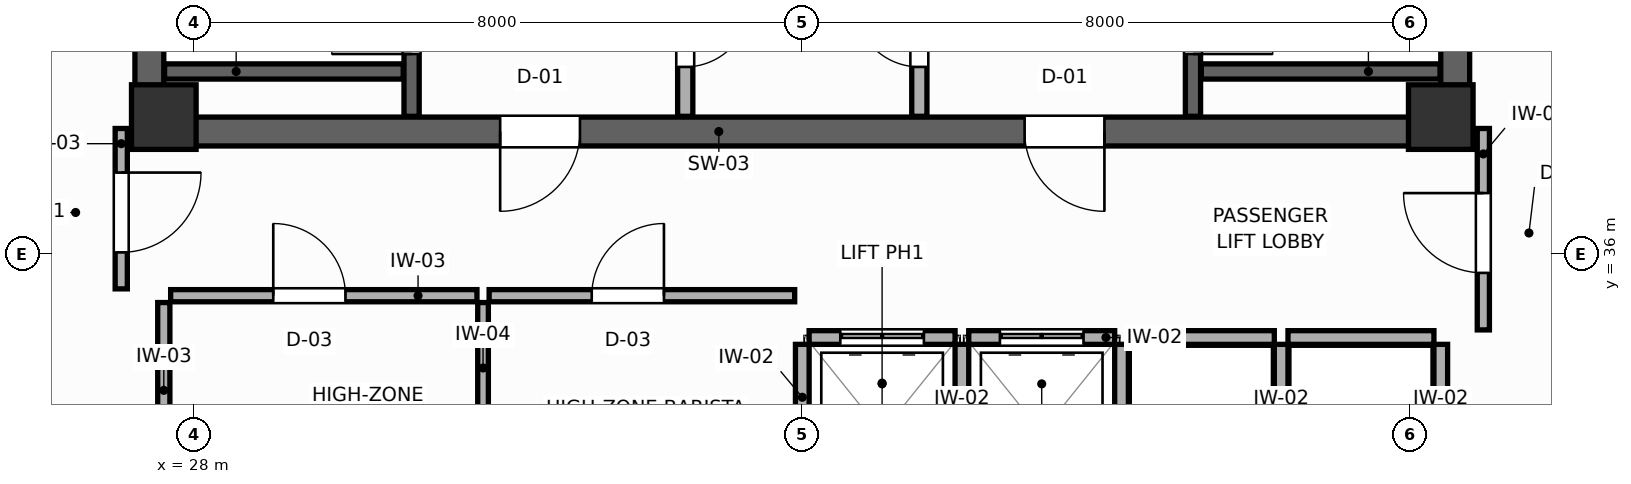
"""IFC4 building model, lengths in metres.
Left out: names, types, materials, properties, quantities, classifications, styles, units other than length and angle.
Written with IfcOpenShell. Run it as: python <this file> out.ifc"""

import sys

from ifc_helpers import new_model, si_unit, direction, frame, frame_2d, origin, origin_2d, place, context, subcontext, project, spatial, rectangle, extrude, source, transform, mapped, element, fill, save


model = new_model("IFC4")
c1 = context("Model", 3, precision=1e-05, world=origin(), true_north=direction((0.0, 1.0)))
c2 = subcontext(c1, "Body", "Model", "MODEL_VIEW")
j1 = project(units=[si_unit("LENGTHUNIT", "METRE"), si_unit("PLANEANGLEUNIT", "RADIAN")], contexts=[c1])
p1 = place(None, origin())
s1 = spatial("IfcSite", under=j1, at=p1, CompositionType="ELEMENT")
p2 = place(p1, origin())
s2 = spatial("IfcBuilding", under=s1, at=p2, CompositionType="ELEMENT")
p3 = place(p2, frame((0.0, 0.0, 268.2)))
s3 = spatial("IfcBuildingStorey", under=s2, at=p3, CompositionType="ELEMENT", Elevation=268.2)
p4 = place(p3, frame((27.22, 37.61, 0.0), z_axis=(0.0, 0.0, 1.0), x_axis=(1.0, 0.0, 0.0)))
e1 = element("IfcWall", 1, at=p4, inside=s3, PredefinedType="SHEAR", context=c2, shape_type="SweptSolid", body=[
    extrude(rectangle(XDim=17.56, YDim=0.38, at=frame_2d((8.78, 0.0))), origin(), (0.0, 0.0, 1.0), 3.6),
])
p5 = place(p4, frame((4.805, 0.0, 0.0)))
e2 = element("IfcOpeningElement", 2, at=p5, cuts=e1, PredefinedType="OPENING", context=c2, shape_type="SweptSolid", body=[
    extrude(rectangle(XDim=1.05, YDim=2.1, at=frame_2d((0.525, 1.05))), frame((0.0, 0.2, 0.0), z_axis=(0.0, -1.0, 0.0), x_axis=(1.0, 0.0, 0.0)), (0.0, 0.0, 1.0), 0.4),
])
p6 = place(p4, frame((11.705, 0.0, 0.0)))
e3 = element("IfcOpeningElement", 3, at=p6, cuts=e1, PredefinedType="OPENING", context=c2, shape_type="SweptSolid", body=[
    extrude(rectangle(XDim=1.05, YDim=2.1, at=frame_2d((0.525, 1.05))), frame((0.0, 0.2, 0.0), z_axis=(0.0, -1.0, 0.0), x_axis=(1.0, 0.0, 0.0)), (0.0, 0.0, 1.0), 0.4),
])
for number, where, z_axis, x_axis in (
    (4, (27.41, 37.8, 0.0), (0.0, 0.0, 1.0), (0.0, 1.0, 0.0)),
    (5, (44.59, 37.8, 0.0), (0.0, 0.0, 1.0), (0.0, 1.0, 0.0)),
):
    element("IfcWall", number, at=place(p3, frame(where, z_axis=z_axis, x_axis=x_axis)), inside=s3, PredefinedType="SHEAR", context=c2, shape_type="SweptSolid", body=[
        extrude(rectangle(XDim=9.0, YDim=0.38, at=frame_2d((4.5, 0.0))), origin(), (0.0, 0.0, 1.0), 3.6),
    ])
m1 = source(origin(), c2, "Body", "SweptSolid", [
    extrude(rectangle(XDim=0.85, YDim=0.85, at=origin_2d()), origin(), (0.0, 0.0, 1.0), 3.6),
])
for number, where, z_axis, x_axis in (
    (6, (27.6, 37.8, 0.0), (0.0, 0.0, 1.0), (1.0, 0.0, 0.0)),
    (7, (44.4, 37.8, 0.0), (0.0, 0.0, 1.0), (1.0, 0.0, 0.0)),
):
    element("IfcColumn", number, at=place(p3, frame(where, z_axis=z_axis, x_axis=x_axis)), inside=s3, PredefinedType="COLUMN", context=c2, shape_type="MappedRepresentation", body=[
        mapped(m1, transform((0.0, 0.0, 0.0), scale=1.0)),
    ])
p7 = place(p3, frame((30.86, 37.81, 0.0), z_axis=(0.0, 0.0, 1.0), x_axis=(0.0, 1.0, 0.0)))
e8 = element("IfcWall", 8, at=p7, inside=s3, PredefinedType="SHEAR", context=c2, shape_type="SweptSolid", body=[
    extrude(rectangle(XDim=8.98, YDim=0.2, at=frame_2d((4.49, 0.0))), origin(), (0.0, 0.0, 1.0), 3.6),
])
p8 = place(p7, frame((0.82, 0.0, 0.0)))
e9 = element("IfcOpeningElement", 9, at=p8, cuts=e8, PredefinedType="OPENING", context=c2, shape_type="SweptSolid", body=[
    extrude(rectangle(XDim=1.05, YDim=2.1, at=frame_2d((0.525, 1.05))), frame((0.0, 0.11, 0.0), z_axis=(0.0, -1.0, 0.0), x_axis=(1.0, 0.0, 0.0)), (0.0, 0.0, 1.0), 0.22),
])
p9 = place(p3, frame((27.61, 38.4, 0.0), z_axis=(0.0, 0.0, 1.0), x_axis=(1.0, 0.0, 0.0)))
e10 = element("IfcWall", 10, at=p9, inside=s3, PredefinedType="SHEAR", context=c2, shape_type="SweptSolid", body=[
    extrude(rectangle(XDim=3.14, YDim=0.2, at=frame_2d((1.57, 0.0))), origin(), (0.0, 0.0, 1.0), 3.6),
])
p10 = place(p3, frame((41.14, 37.81, 0.0), z_axis=(0.0, 0.0, 1.0), x_axis=(0.0, 1.0, 0.0)))
e11 = element("IfcWall", 11, at=p10, inside=s3, PredefinedType="SHEAR", context=c2, shape_type="SweptSolid", body=[
    extrude(rectangle(XDim=8.98, YDim=0.2, at=frame_2d((4.49, 0.0))), origin(), (0.0, 0.0, 1.0), 3.6),
])
p11 = place(p10, frame((0.82, 0.0, 0.0)))
e12 = element("IfcOpeningElement", 12, at=p11, cuts=e11, PredefinedType="OPENING", context=c2, shape_type="SweptSolid", body=[
    extrude(rectangle(XDim=1.05, YDim=2.1, at=frame_2d((0.525, 1.05))), frame((0.0, 0.11, 0.0), z_axis=(0.0, -1.0, 0.0), x_axis=(1.0, 0.0, 0.0)), (0.0, 0.0, 1.0), 0.22),
])
p12 = place(p3, frame((41.25, 38.4, 0.0), z_axis=(0.0, 0.0, 1.0), x_axis=(1.0, 0.0, 0.0)))
e13 = element("IfcWall", 13, at=p12, inside=s3, PredefinedType="SHEAR", context=c2, shape_type="SweptSolid", body=[
    extrude(rectangle(XDim=3.14, YDim=0.2, at=frame_2d((1.57, 0.0))), origin(), (0.0, 0.0, 1.0), 3.6),
])
p13 = place(p3, frame((34.46, 37.81, 0.0), z_axis=(0.0, 0.0, 1.0), x_axis=(0.0, 1.0, 0.0)))
e14 = element("IfcWall", 14, at=p13, inside=s3, PredefinedType="PARTITIONING", context=c2, shape_type="SweptSolid", body=[
    extrude(rectangle(XDim=8.98, YDim=0.2, at=frame_2d((4.49, 0.0))), origin(), (0.0, 0.0, 1.0), 3.41),
])
p14 = place(p13, frame((0.65, 0.0, 0.0)))
e15 = element("IfcOpeningElement", 15, at=p14, cuts=e14, PredefinedType="OPENING", context=c2, shape_type="SweptSolid", body=[
    extrude(rectangle(XDim=0.85, YDim=2.05, at=frame_2d((0.425, 1.025))), frame((0.0, 0.11, 0.0), z_axis=(0.0, -1.0, 0.0), x_axis=(1.0, 0.0, 0.0)), (0.0, 0.0, 1.0), 0.22),
])
p15 = place(p3, frame((37.54, 37.81, 0.0), z_axis=(0.0, 0.0, 1.0), x_axis=(0.0, 1.0, 0.0)))
e16 = element("IfcWall", 16, at=p15, inside=s3, PredefinedType="PARTITIONING", context=c2, shape_type="SweptSolid", body=[
    extrude(rectangle(XDim=8.98, YDim=0.2, at=frame_2d((4.49, 0.0))), origin(), (0.0, 0.0, 1.0), 3.41),
])
p16 = place(p15, frame((0.65, 0.0, 0.0)))
e17 = element("IfcOpeningElement", 17, at=p16, cuts=e16, PredefinedType="OPENING", context=c2, shape_type="SweptSolid", body=[
    extrude(rectangle(XDim=0.85, YDim=2.05, at=frame_2d((0.425, 1.025))), frame((0.0, 0.11, 0.0), z_axis=(0.0, -1.0, 0.0), x_axis=(1.0, 0.0, 0.0)), (0.0, 0.0, 1.0), 0.22),
])
p17 = place(p3, frame((36.09, 34.9, 0.0), z_axis=(0.0, 0.0, 1.0), x_axis=(1.0, 0.0, 0.0)))
e18 = element("IfcWall", 18, at=p17, inside=s3, PredefinedType="PARTITIONING", context=c2, shape_type="SweptSolid", body=[
    extrude(rectangle(XDim=1.92, YDim=0.18, at=frame_2d((0.96, 0.0))), origin(), (0.0, 0.0, 1.0), 3.41),
])
p18 = place(p17, frame((0.41, 0.0, 0.0)))
e19 = element("IfcOpeningElement", 19, at=p18, cuts=e18, PredefinedType="OPENING", context=c2, shape_type="SweptSolid", body=[
    extrude(rectangle(XDim=1.1, YDim=2.1, at=frame_2d((0.55, 1.05))), frame((0.0, 0.1, 0.0), z_axis=(0.0, -1.0, 0.0), x_axis=(1.0, 0.0, 0.0)), (0.0, 0.0, 1.0), 0.2),
])
p19 = place(p3, frame((36.0, 32.49, 0.0), z_axis=(0.0, 0.0, 1.0), x_axis=(0.0, 1.0, 0.0)))
e20 = element("IfcWall", 20, at=p19, inside=s3, PredefinedType="PARTITIONING", context=c2, shape_type="SweptSolid", body=[
    extrude(rectangle(XDim=2.32, YDim=0.18, at=frame_2d((1.16, 0.0))), origin(), (0.0, 0.0, 1.0), 3.41),
])
p20 = place(p3, frame((38.19, 34.9, 0.0), z_axis=(0.0, 0.0, 1.0), x_axis=(1.0, 0.0, 0.0)))
e21 = element("IfcWall", 21, at=p20, inside=s3, PredefinedType="PARTITIONING", context=c2, shape_type="SweptSolid", body=[
    extrude(rectangle(XDim=1.92, YDim=0.18, at=frame_2d((0.96, 0.0))), origin(), (0.0, 0.0, 1.0), 3.41),
])
p21 = place(p20, frame((0.41, 0.0, 0.0)))
e22 = element("IfcOpeningElement", 22, at=p21, cuts=e21, PredefinedType="OPENING", context=c2, shape_type="SweptSolid", body=[
    extrude(rectangle(XDim=1.1, YDim=2.1, at=frame_2d((0.55, 1.05))), frame((0.0, 0.1, 0.0), z_axis=(0.0, -1.0, 0.0), x_axis=(1.0, 0.0, 0.0)), (0.0, 0.0, 1.0), 0.2),
])
p22 = place(p3, frame((38.1, 32.49, 0.0), z_axis=(0.0, 0.0, 1.0), x_axis=(0.0, 1.0, 0.0)))
e23 = element("IfcWall", 23, at=p22, inside=s3, PredefinedType="PARTITIONING", context=c2, shape_type="SweptSolid", body=[
    extrude(rectangle(XDim=2.32, YDim=0.18, at=frame_2d((1.16, 0.0))), origin(), (0.0, 0.0, 1.0), 3.41),
])
p23 = place(p3, frame((40.29, 34.9, 0.0), z_axis=(0.0, 0.0, 1.0), x_axis=(1.0, 0.0, 0.0)))
e24 = element("IfcWall", 24, at=p23, inside=s3, PredefinedType="PARTITIONING", context=c2, shape_type="SweptSolid", body=[
    extrude(rectangle(XDim=1.92, YDim=0.18, at=frame_2d((0.96, 0.0))), origin(), (0.0, 0.0, 1.0), 3.41),
])
p24 = place(p3, frame((40.2, 32.49, 0.0), z_axis=(0.0, 0.0, 1.0), x_axis=(0.0, 1.0, 0.0)))
e25 = element("IfcWall", 25, at=p24, inside=s3, PredefinedType="PARTITIONING", context=c2, shape_type="SweptSolid", body=[
    extrude(rectangle(XDim=2.32, YDim=0.18, at=frame_2d((1.16, 0.0))), origin(), (0.0, 0.0, 1.0), 3.41),
])
p25 = place(p3, frame((42.39, 34.9, 0.0), z_axis=(0.0, 0.0, 1.0), x_axis=(1.0, 0.0, 0.0)))
e26 = element("IfcWall", 26, at=p25, inside=s3, PredefinedType="PARTITIONING", context=c2, shape_type="SweptSolid", body=[
    extrude(rectangle(XDim=1.92, YDim=0.18, at=frame_2d((0.96, 0.0))), origin(), (0.0, 0.0, 1.0), 3.41),
])
for number, where, z_axis, x_axis in (
    (27, (42.3, 32.49, 0.0), (0.0, 0.0, 1.0), (0.0, 1.0, 0.0)),
    (28, (44.4, 32.49, 0.0), (0.0, 0.0, 1.0), (0.0, 1.0, 0.0)),
):
    element("IfcWall", number, at=place(p3, frame(where, z_axis=z_axis, x_axis=x_axis)), inside=s3, PredefinedType="PARTITIONING", context=c2, shape_type="SweptSolid", body=[
        extrude(rectangle(XDim=2.32, YDim=0.18, at=frame_2d((1.16, 0.0))), origin(), (0.0, 0.0, 1.0), 3.41),
    ])
p26 = place(p3, frame((27.6, 33.05, 0.0), z_axis=(0.0, 0.0, 1.0), x_axis=(0.0, 1.0, 0.0)))
e29 = element("IfcWall", 29, at=p26, inside=s3, PredefinedType="PARTITIONING", context=c2, shape_type="SweptSolid", body=[
    extrude(rectangle(XDim=2.31, YDim=0.16, at=frame_2d((1.155, 0.0))), origin(), (0.0, 0.0, 1.0), 3.41),
])
p27 = place(p3, frame((31.8, 32.49, 0.0), z_axis=(0.0, 0.0, 1.0), x_axis=(0.0, 1.0, 0.0)))
e30 = element("IfcWall", 30, at=p27, inside=s3, PredefinedType="PARTITIONING", context=c2, shape_type="SweptSolid", body=[
    extrude(rectangle(XDim=2.87, YDim=0.14, at=frame_2d((1.435, 0.0))), origin(), (0.0, 0.0, 1.0), 3.41),
])
p28 = place(p3, frame((27.69, 35.45, 0.0), z_axis=(0.0, 0.0, 1.0), x_axis=(1.0, 0.0, 0.0)))
e31 = element("IfcWall", 31, at=p28, inside=s3, PredefinedType="PARTITIONING", context=c2, shape_type="SweptSolid", body=[
    extrude(rectangle(XDim=4.03, YDim=0.16, at=frame_2d((2.015, 0.0))), origin(), (0.0, 0.0, 1.0), 3.41),
])
p29 = place(p28, frame((1.35, 0.0, 0.0)))
e32 = element("IfcOpeningElement", 32, at=p29, cuts=e31, PredefinedType="OPENING", context=c2, shape_type="SweptSolid", body=[
    extrude(rectangle(XDim=0.95, YDim=2.05, at=frame_2d((0.475, 1.025))), frame((0.0, 0.09, 0.0), z_axis=(0.0, -1.0, 0.0), x_axis=(1.0, 0.0, 0.0)), (0.0, 0.0, 1.0), 0.18),
])
p30 = place(p3, frame((31.88, 35.45, 0.0), z_axis=(0.0, 0.0, 1.0), x_axis=(1.0, 0.0, 0.0)))
e33 = element("IfcWall", 33, at=p30, inside=s3, PredefinedType="PARTITIONING", context=c2, shape_type="SweptSolid", body=[
    extrude(rectangle(XDim=4.02, YDim=0.16, at=frame_2d((2.01, 0.0))), origin(), (0.0, 0.0, 1.0), 3.41),
])
p31 = place(p30, frame((1.35, 0.0, 0.0)))
e34 = element("IfcOpeningElement", 34, at=p31, cuts=e33, PredefinedType="OPENING", context=c2, shape_type="SweptSolid", body=[
    extrude(rectangle(XDim=0.95, YDim=2.05, at=frame_2d((0.475, 1.025))), frame((0.0, 0.09, 0.0), z_axis=(0.0, -1.0, 0.0), x_axis=(1.0, 0.0, 0.0)), (0.0, 0.0, 1.0), 0.18),
])
p32 = place(p3, frame((27.04, 35.54, 0.0), z_axis=(0.0, 0.0, 1.0), x_axis=(0.0, 1.0, 0.0)))
e35 = element("IfcWall", 35, at=p32, inside=s3, PredefinedType="PARTITIONING", context=c2, shape_type="SweptSolid", body=[
    extrude(rectangle(XDim=2.11, YDim=0.16, at=frame_2d((1.055, 0.0))), origin(), (0.0, 0.0, 1.0), 3.41),
])
p33 = place(p32, frame((0.48, 0.0, 0.0)))
e36 = element("IfcOpeningElement", 36, at=p33, cuts=e35, PredefinedType="OPENING", context=c2, shape_type="SweptSolid", body=[
    extrude(rectangle(XDim=1.05, YDim=2.1, at=frame_2d((0.525, 1.05))), frame((0.0, 0.09, 0.0), z_axis=(0.0, -1.0, 0.0), x_axis=(1.0, 0.0, 0.0)), (0.0, 0.0, 1.0), 0.18),
])
p34 = place(p3, frame((44.96, 35.0, 0.0), z_axis=(0.0, 0.0, 1.0), x_axis=(0.0, 1.0, 0.0)))
e37 = element("IfcWall", 37, at=p34, inside=s3, PredefinedType="PARTITIONING", context=c2, shape_type="SweptSolid", body=[
    extrude(rectangle(XDim=2.65, YDim=0.16, at=frame_2d((1.325, 0.0))), origin(), (0.0, 0.0, 1.0), 3.41),
])
p35 = place(p34, frame((0.75, 0.0, 0.0)))
e38 = element("IfcOpeningElement", 38, at=p35, cuts=e37, PredefinedType="OPENING", context=c2, shape_type="SweptSolid", body=[
    extrude(rectangle(XDim=1.05, YDim=2.1, at=frame_2d((0.525, 1.05))), frame((0.0, 0.09, 0.0), z_axis=(0.0, -1.0, 0.0), x_axis=(1.0, 0.0, 0.0)), (0.0, 0.0, 1.0), 0.18),
])
p36 = place(p8, origin())
e39 = element("IfcDoor", 39, at=p36, inside=s3, OperationType="SINGLE_SWING_LEFT", PredefinedType="DOOR", context=c2, shape_type="SweptSolid", body=[
    extrude(rectangle(XDim=1.05, YDim=2.1, at=frame_2d((0.525, 1.05))), frame((0.0, 0.025, 0.0), z_axis=(0.0, -1.0, 0.0), x_axis=(1.0, 0.0, 0.0)), (0.0, 0.0, 1.0), 0.05),
])
fill(e9, e39)
p37 = place(p11, frame((1.05, 0.0, 0.0), z_axis=(0.0, 0.0, 1.0), x_axis=(-1.0, 0.0, 0.0)))
e40 = element("IfcDoor", 40, at=p37, inside=s3, OperationType="SINGLE_SWING_RIGHT", PredefinedType="DOOR", context=c2, shape_type="SweptSolid", body=[
    extrude(rectangle(XDim=1.05, YDim=2.1, at=frame_2d((0.525, 1.05))), frame((0.0, 0.025, 0.0), z_axis=(0.0, -1.0, 0.0), x_axis=(1.0, 0.0, 0.0)), (0.0, 0.0, 1.0), 0.05),
])
fill(e12, e40)
p38 = place(p14, frame((0.85, 0.0, 0.0), z_axis=(0.0, 0.0, 1.0), x_axis=(-1.0, 0.0, 0.0)))
e41 = element("IfcDoor", 41, at=p38, inside=s3, OperationType="SINGLE_SWING_LEFT", PredefinedType="DOOR", context=c2, shape_type="SweptSolid", body=[
    extrude(rectangle(XDim=0.85, YDim=2.05, at=frame_2d((0.425, 1.025))), frame((0.0, 0.025, 0.0), z_axis=(0.0, -1.0, 0.0), x_axis=(1.0, 0.0, 0.0)), (0.0, 0.0, 1.0), 0.05),
])
fill(e15, e41)
p39 = place(p16, origin())
e42 = element("IfcDoor", 42, at=p39, inside=s3, OperationType="SINGLE_SWING_RIGHT", PredefinedType="DOOR", context=c2, shape_type="SweptSolid", body=[
    extrude(rectangle(XDim=0.85, YDim=2.05, at=frame_2d((0.425, 1.025))), frame((0.0, 0.025, 0.0), z_axis=(0.0, -1.0, 0.0), x_axis=(1.0, 0.0, 0.0)), (0.0, 0.0, 1.0), 0.05),
])
fill(e17, e42)
p40 = place(p18, origin())
e43 = element("IfcDoor", 43, at=p40, inside=s3, OperationType="DOUBLE_DOOR_SLIDING", PredefinedType="DOOR", context=c2, shape_type="SweptSolid", body=[
    extrude(rectangle(XDim=1.1, YDim=2.1, at=frame_2d((0.55, 1.05))), frame((0.0, 0.025, 0.0), z_axis=(0.0, -1.0, 0.0), x_axis=(1.0, 0.0, 0.0)), (0.0, 0.0, 1.0), 0.05),
])
fill(e19, e43)
p41 = place(p21, origin())
e44 = element("IfcDoor", 44, at=p41, inside=s3, OperationType="DOUBLE_DOOR_SLIDING", PredefinedType="DOOR", context=c2, shape_type="SweptSolid", body=[
    extrude(rectangle(XDim=1.1, YDim=2.1, at=frame_2d((0.55, 1.05))), frame((0.0, 0.025, 0.0), z_axis=(0.0, -1.0, 0.0), x_axis=(1.0, 0.0, 0.0)), (0.0, 0.0, 1.0), 0.05),
])
fill(e22, e44)
p42 = place(p29, origin())
e45 = element("IfcDoor", 45, at=p42, inside=s3, OperationType="SINGLE_SWING_LEFT", PredefinedType="DOOR", context=c2, shape_type="SweptSolid", body=[
    extrude(rectangle(XDim=0.95, YDim=2.05, at=frame_2d((0.475, 1.025))), frame((0.0, 0.025, 0.0), z_axis=(0.0, -1.0, 0.0), x_axis=(1.0, 0.0, 0.0)), (0.0, 0.0, 1.0), 0.05),
])
fill(e32, e45)
p43 = place(p31, origin())
e46 = element("IfcDoor", 46, at=p43, inside=s3, OperationType="SINGLE_SWING_RIGHT", PredefinedType="DOOR", context=c2, shape_type="SweptSolid", body=[
    extrude(rectangle(XDim=0.95, YDim=2.05, at=frame_2d((0.475, 1.025))), frame((0.0, 0.025, 0.0), z_axis=(0.0, -1.0, 0.0), x_axis=(1.0, 0.0, 0.0)), (0.0, 0.0, 1.0), 0.05),
])
fill(e34, e46)
p44 = place(p33, frame((1.05, 0.0, 0.0), z_axis=(0.0, 0.0, 1.0), x_axis=(-1.0, 0.0, 0.0)))
e47 = element("IfcDoor", 47, at=p44, inside=s3, OperationType="SINGLE_SWING_LEFT", PredefinedType="DOOR", context=c2, shape_type="SweptSolid", body=[
    extrude(rectangle(XDim=1.05, YDim=2.1, at=frame_2d((0.525, 1.05))), frame((0.0, 0.025, 0.0), z_axis=(0.0, -1.0, 0.0), x_axis=(1.0, 0.0, 0.0)), (0.0, 0.0, 1.0), 0.05),
])
fill(e36, e47)
p45 = place(p35, origin())
e48 = element("IfcDoor", 48, at=p45, inside=s3, OperationType="SINGLE_SWING_RIGHT", PredefinedType="DOOR", context=c2, shape_type="SweptSolid", body=[
    extrude(rectangle(XDim=1.05, YDim=2.1, at=frame_2d((0.525, 1.05))), frame((0.0, 0.025, 0.0), z_axis=(0.0, -1.0, 0.0), x_axis=(1.0, 0.0, 0.0)), (0.0, 0.0, 1.0), 0.05),
])
fill(e38, e48)
p46 = place(p5, frame((1.05, 0.0, 0.0), z_axis=(0.0, 0.0, 1.0), x_axis=(-1.0, 0.0, 0.0)))
e49 = element("IfcDoor", 49, at=p46, inside=s3, OperationType="SINGLE_SWING_RIGHT", PredefinedType="DOOR", context=c2, shape_type="SweptSolid", body=[
    extrude(rectangle(XDim=1.05, YDim=2.1, at=frame_2d((0.525, 1.05))), frame((0.0, 0.025, 0.0), z_axis=(0.0, -1.0, 0.0), x_axis=(1.0, 0.0, 0.0)), (0.0, 0.0, 1.0), 0.05),
])
fill(e2, e49)
p47 = place(p6, frame((1.05, 0.0, 0.0), z_axis=(0.0, 0.0, 1.0), x_axis=(-1.0, 0.0, 0.0)))
e50 = element("IfcDoor", 50, at=p47, inside=s3, OperationType="SINGLE_SWING_LEFT", PredefinedType="DOOR", context=c2, shape_type="SweptSolid", body=[
    extrude(rectangle(XDim=1.05, YDim=2.1, at=frame_2d((0.525, 1.05))), frame((0.0, 0.025, 0.0), z_axis=(0.0, -1.0, 0.0), x_axis=(1.0, 0.0, 0.0)), (0.0, 0.0, 1.0), 0.05),
])
fill(e3, e50)
save(model, sys.argv[1])
